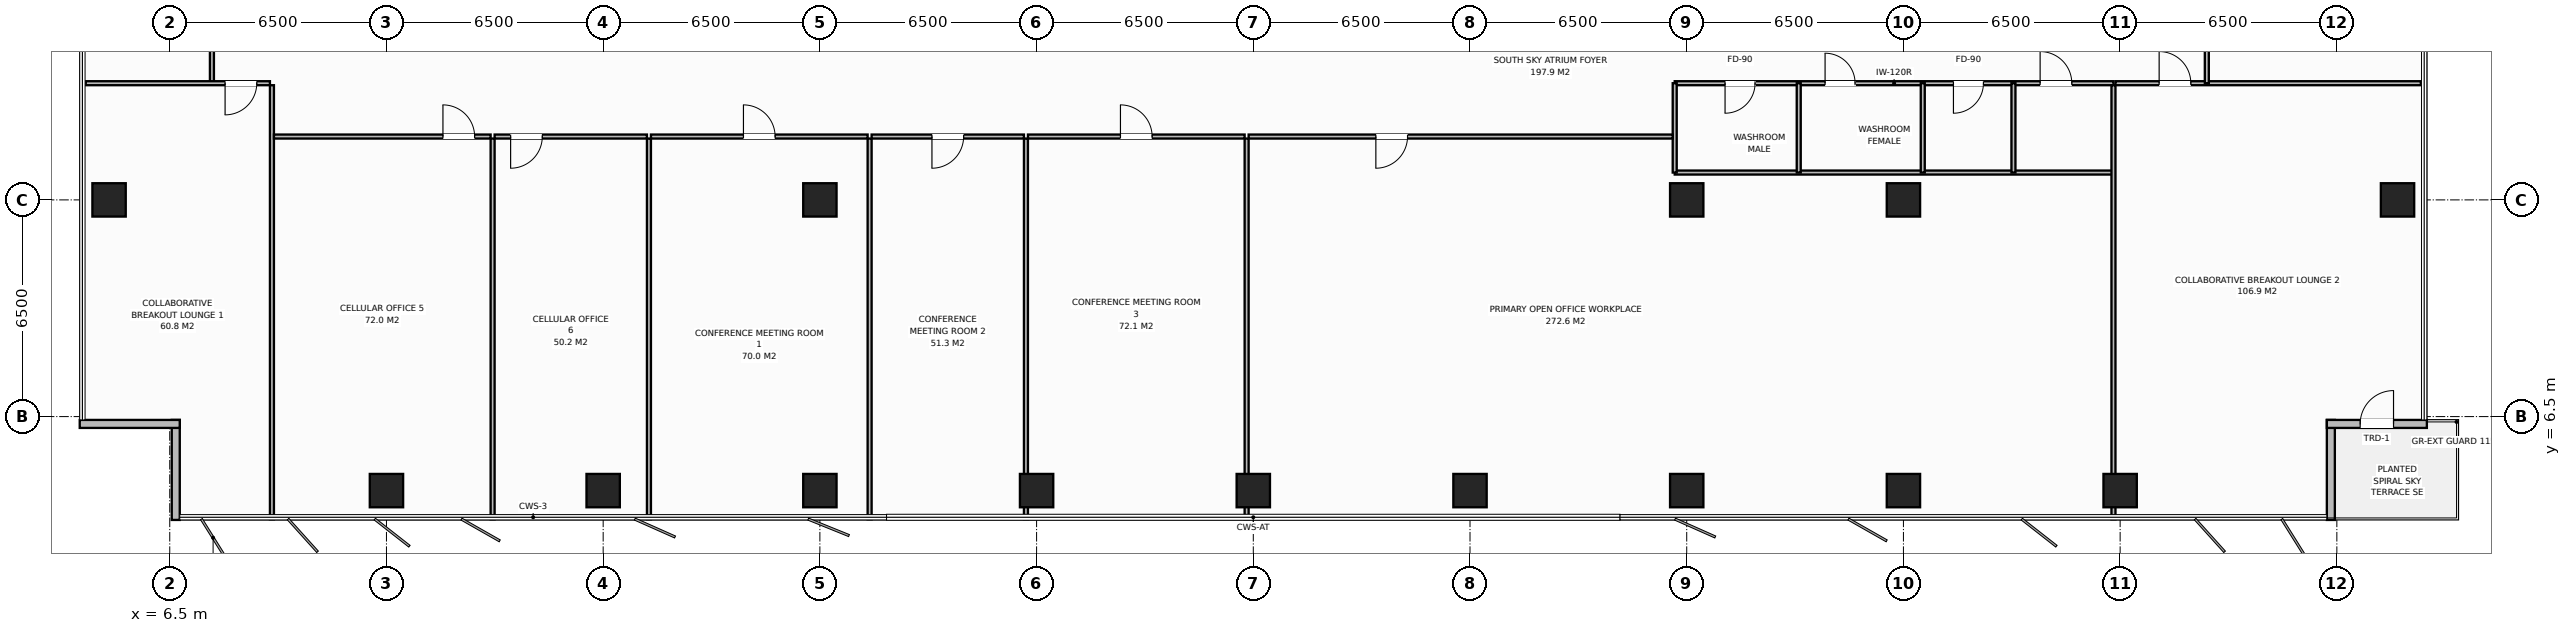
"""IFC4 building model, lengths in metres.
Left out: names, types, materials, properties, quantities, classifications, styles, units other than length and angle.
Written with IfcOpenShell. Run it as: python <this file> out.ifc"""

import sys

from ifc_helpers import new_model, si_unit, direction, frame, frame_2d, origin, origin_2d, place, context, subcontext, project, spatial, rectangle, extrude, element, fill, save


model = new_model("IFC4")
c1 = context("Model", 3, precision=1e-05, world=origin(), true_north=direction((0.0, 1.0)))
c2 = subcontext(c1, "Body", "Model", "MODEL_VIEW")
j1 = project(units=[si_unit("LENGTHUNIT", "METRE"), si_unit("PLANEANGLEUNIT", "RADIAN")], contexts=[c1])
p1 = place(None, origin())
s1 = spatial("IfcSite", under=j1, at=p1, CompositionType="ELEMENT")
p2 = place(p1, origin())
s2 = spatial("IfcBuilding", under=s1, at=p2, CompositionType="ELEMENT")
p3 = place(p2, frame((0.0, 0.0, 174.6)))
s3 = spatial("IfcBuildingStorey", under=s2, at=p3, CompositionType="ELEMENT", Elevation=174.6)
for number, where, z_axis, x_axis in (
    (1, (58.5, 13.0, 0.0), (0.0, 0.0, 1.0), (1.0, 0.0, 0.0)),
    (2, (26.0, 13.0, 0.0), (0.0, 0.0, 1.0), (1.0, 0.0, 0.0)),
    (3, (52.0, 13.0, 0.0), (0.0, 0.0, 1.0), (1.0, 0.0, 0.0)),
    (4, (13.0, 4.28, 0.0), (0.0, 0.0, 1.0), (1.0, 0.0, 0.0)),
    (5, (19.5, 4.28, 0.0), (0.0, 0.0, 1.0), (1.0, 0.0, 0.0)),
    (6, (26.0, 4.28, 0.0), (0.0, 0.0, 1.0), (1.0, 0.0, 0.0)),
    (7, (32.5, 4.28, 0.0), (0.0, 0.0, 1.0), (1.0, 0.0, 0.0)),
    (8, (39.0, 4.28, 0.0), (0.0, 0.0, 1.0), (1.0, 0.0, 0.0)),
    (9, (45.5, 4.28, 0.0), (0.0, 0.0, 1.0), (1.0, 0.0, 0.0)),
    (10, (52.0, 4.28, 0.0), (0.0, 0.0, 1.0), (1.0, 0.0, 0.0)),
    (11, (58.5, 4.28, 0.0), (0.0, 0.0, 1.0), (1.0, 0.0, 0.0)),
    (12, (65.0, 4.28, 0.0), (0.0, 0.0, 1.0), (1.0, 0.0, 0.0)),
    (13, (4.68, 13.0, 0.0), (0.0, 0.0, 1.0), (1.0, 0.0, 0.0)),
    (14, (73.32, 13.0, 0.0), (0.0, 0.0, 1.0), (1.0, 0.0, 0.0)),
):
    element("IfcColumn", number, at=place(p3, frame(where, z_axis=z_axis, x_axis=x_axis)), inside=s3, PredefinedType="COLUMN", context=c2, shape_type="SweptSolid", body=[
        extrude(rectangle(XDim=1.0, YDim=1.0, at=origin_2d()), origin(), (0.0, 0.0, 1.0), 3.8),
    ])
for number, where, z_axis, x_axis in (
    (15, (6.68, 3.4, 0.0), (0.0, 0.0, 1.0), (0.0, 1.0, 0.0)),
    (16, (6.8, 6.28, 0.0), (0.0, 0.0, 1.0), (-1.0, 0.0, 0.0)),
    (17, (71.32, 6.4, 0.0), (0.0, 0.0, 1.0), (0.0, -1.0, 0.0)),
):
    element("IfcWall", number, at=place(p3, frame(where, z_axis=z_axis, x_axis=x_axis)), inside=s3, PredefinedType="STANDARD", context=c2, shape_type="SweptSolid", body=[
        extrude(rectangle(XDim=3.0, YDim=0.24, at=frame_2d((1.5, 0.0))), origin(), (0.0, 0.0, 1.0), 3.572),
    ])
p4 = place(p3, frame((74.2, 6.28, 0.0), z_axis=(0.0, 0.0, 1.0), x_axis=(-1.0, 0.0, 0.0)))
e18 = element("IfcWall", 18, at=p4, inside=s3, PredefinedType="STANDARD", context=c2, shape_type="SweptSolid", body=[
    extrude(rectangle(XDim=3.0, YDim=0.24, at=frame_2d((1.5, 0.0))), origin(), (0.0, 0.0, 1.0), 3.572),
])
p5 = place(p4, frame((1.0, 0.0, 0.0)))
e19 = element("IfcOpeningElement", 19, at=p5, cuts=e18, PredefinedType="OPENING", context=c2, shape_type="SweptSolid", body=[
    extrude(rectangle(XDim=1.0, YDim=2.2, at=frame_2d((0.5, 1.1))), frame((0.0, 0.13, 0.0), z_axis=(0.0, -1.0, 0.0), x_axis=(1.0, 0.0, 0.0)), (0.0, 0.0, 1.0), 0.26),
])
p6 = place(p3, frame((7.765, 16.5, 0.0), z_axis=(0.0, 0.0, 1.0), x_axis=(0.0, 1.0, 0.0)))
e20 = element("IfcWall", 20, at=p6, inside=s3, PredefinedType="PARTITIONING", context=c2, shape_type="SweptSolid", body=[
    extrude(rectangle(XDim=2.1, YDim=0.12, at=frame_2d((1.05, 0.0))), origin(), (0.0, 0.0, 1.0), 3.572),
])
p7 = place(p3, frame((51.64, 16.5, 0.0), z_axis=(0.0, 0.0, 1.0), x_axis=(1.0, 0.0, 0.0)))
e21 = element("IfcWall", 21, at=p7, inside=s3, PredefinedType="PARTITIONING", context=c2, shape_type="SweptSolid", body=[
    extrude(rectangle(XDim=13.16, YDim=0.12, at=frame_2d((6.58, 0.0))), origin(), (0.0, 0.0, 1.0), 3.572),
])
p8 = place(p7, frame((1.51, 0.0, 0.0)))
e22 = element("IfcOpeningElement", 22, at=p8, cuts=e21, PredefinedType="OPENING", context=c2, shape_type="SweptSolid", body=[
    extrude(rectangle(XDim=0.9, YDim=2.15, at=frame_2d((0.45, 1.075))), frame((0.0, 0.07, 0.0), z_axis=(0.0, -1.0, 0.0), x_axis=(1.0, 0.0, 0.0)), (0.0, 0.0, 1.0), 0.14),
])
p9 = place(p7, frame((4.51, 0.0, 0.0)))
e23 = element("IfcOpeningElement", 23, at=p9, cuts=e21, PredefinedType="OPENING", context=c2, shape_type="SweptSolid", body=[
    extrude(rectangle(XDim=0.9, YDim=2.15, at=frame_2d((0.45, 1.075))), frame((0.0, 0.07, 0.0), z_axis=(0.0, -1.0, 0.0), x_axis=(1.0, 0.0, 0.0)), (0.0, 0.0, 1.0), 0.14),
])
p10 = place(p7, frame((8.36, 0.0, 0.0)))
e24 = element("IfcOpeningElement", 24, at=p10, cuts=e21, PredefinedType="OPENING", context=c2, shape_type="SweptSolid", body=[
    extrude(rectangle(XDim=0.9, YDim=2.15, at=frame_2d((0.45, 1.075))), frame((0.0, 0.07, 0.0), z_axis=(0.0, -1.0, 0.0), x_axis=(1.0, 0.0, 0.0)), (0.0, 0.0, 1.0), 0.14),
])
p11 = place(p7, frame((10.96, 0.0, 0.0)))
e25 = element("IfcOpeningElement", 25, at=p11, cuts=e21, PredefinedType="OPENING", context=c2, shape_type="SweptSolid", body=[
    extrude(rectangle(XDim=0.95, YDim=2.15, at=frame_2d((0.475, 1.075))), frame((0.0, 0.07, 0.0), z_axis=(0.0, -1.0, 0.0), x_axis=(1.0, 0.0, 0.0)), (0.0, 0.0, 1.0), 0.14),
])
p12 = place(p3, frame((51.64, 13.82, 0.0), z_axis=(0.0, 0.0, 1.0), x_axis=(1.0, 0.0, 0.0)))
e26 = element("IfcWall", 26, at=p12, inside=s3, PredefinedType="PARTITIONING", context=c2, shape_type="SweptSolid", body=[
    extrude(rectangle(XDim=13.16, YDim=0.12, at=frame_2d((6.58, 0.0))), origin(), (0.0, 0.0, 1.0), 3.572),
])
for number, where, z_axis, x_axis in (
    (27, (51.64, 13.82, 0.0), (0.0, 0.0, 1.0), (0.0, 1.0, 0.0)),
    (28, (55.36, 13.82, 0.0), (0.0, 0.0, 1.0), (0.0, 1.0, 0.0)),
    (29, (59.08, 13.82, 0.0), (0.0, 0.0, 1.0), (0.0, 1.0, 0.0)),
    (30, (61.8, 13.82, 0.0), (0.0, 0.0, 1.0), (0.0, 1.0, 0.0)),
):
    element("IfcWall", number, at=place(p3, frame(where, z_axis=z_axis, x_axis=x_axis)), inside=s3, PredefinedType="PARTITIONING", context=c2, shape_type="SweptSolid", body=[
        extrude(rectangle(XDim=2.68, YDim=0.12, at=frame_2d((1.34, 0.0))), origin(), (0.0, 0.0, 1.0), 3.572),
    ])
p13 = place(p3, frame((9.565, 3.42, 0.0), z_axis=(0.0, 0.0, 1.0), x_axis=(0.0, 1.0, 0.0)))
e31 = element("IfcWall", 31, at=p13, inside=s3, PredefinedType="PARTITIONING", context=c2, shape_type="SweptSolid", body=[
    extrude(rectangle(XDim=13.02, YDim=0.12, at=frame_2d((6.51, 0.0))), origin(), (0.0, 0.0, 1.0), 3.572),
])
p14 = place(p3, frame((3.98, 16.5, 0.0), z_axis=(0.0, 0.0, 1.0), x_axis=(1.0, 0.0, 0.0)))
e32 = element("IfcWall", 32, at=p14, inside=s3, PredefinedType="PARTITIONING", context=c2, shape_type="SweptSolid", body=[
    extrude(rectangle(XDim=5.525, YDim=0.12, at=frame_2d((2.762, 0.0))), origin(), (0.0, 0.0, 1.0), 3.572),
])
p15 = place(p14, frame((4.18, 0.0, 0.0)))
e33 = element("IfcOpeningElement", 33, at=p15, cuts=e32, PredefinedType="OPENING", context=c2, shape_type="SweptSolid", body=[
    extrude(rectangle(XDim=0.95, YDim=2.15, at=frame_2d((0.475, 1.075))), frame((0.0, 0.07, 0.0), z_axis=(0.0, -1.0, 0.0), x_axis=(1.0, 0.0, 0.0)), (0.0, 0.0, 1.0), 0.14),
])
p16 = place(p3, frame((16.184, 3.42, 0.0), z_axis=(0.0, 0.0, 1.0), x_axis=(0.0, 1.0, 0.0)))
e34 = element("IfcWall", 34, at=p16, inside=s3, PredefinedType="PARTITIONING", context=c2, shape_type="SweptSolid", body=[
    extrude(rectangle(XDim=11.42, YDim=0.12, at=frame_2d((5.71, 0.0))), origin(), (0.0, 0.0, 1.0), 3.572),
])
p17 = place(p3, frame((9.625, 14.9, 0.0), z_axis=(0.0, 0.0, 1.0), x_axis=(1.0, 0.0, 0.0)))
e35 = element("IfcWall", 35, at=p17, inside=s3, PredefinedType="PARTITIONING", context=c2, shape_type="SweptSolid", body=[
    extrude(rectangle(XDim=6.499, YDim=0.12, at=frame_2d((3.25, 0.0))), origin(), (0.0, 0.0, 1.0), 3.572),
])
p18 = place(p17, frame((5.069, 0.0, 0.0)))
e36 = element("IfcOpeningElement", 36, at=p18, cuts=e35, PredefinedType="OPENING", context=c2, shape_type="SweptSolid", body=[
    extrude(rectangle(XDim=0.95, YDim=2.15, at=frame_2d((0.475, 1.075))), frame((0.0, 0.07, 0.0), z_axis=(0.0, -1.0, 0.0), x_axis=(1.0, 0.0, 0.0)), (0.0, 0.0, 1.0), 0.14),
])
p19 = place(p3, frame((20.873, 3.42, 0.0), z_axis=(0.0, 0.0, 1.0), x_axis=(0.0, 1.0, 0.0)))
e37 = element("IfcWall", 37, at=p19, inside=s3, PredefinedType="PARTITIONING", context=c2, shape_type="SweptSolid", body=[
    extrude(rectangle(XDim=11.42, YDim=0.12, at=frame_2d((5.71, 0.0))), origin(), (0.0, 0.0, 1.0), 3.572),
])
p20 = place(p3, frame((16.244, 14.9, 0.0), z_axis=(0.0, 0.0, 1.0), x_axis=(1.0, 0.0, 0.0)))
e38 = element("IfcWall", 38, at=p20, inside=s3, PredefinedType="PARTITIONING", context=c2, shape_type="SweptSolid", body=[
    extrude(rectangle(XDim=4.569, YDim=0.12, at=frame_2d((2.284, 0.0))), origin(), (0.0, 0.0, 1.0), 3.572),
])
p21 = place(p20, frame((0.48, 0.0, 0.0)))
e39 = element("IfcOpeningElement", 39, at=p21, cuts=e38, PredefinedType="OPENING", context=c2, shape_type="SweptSolid", body=[
    extrude(rectangle(XDim=0.95, YDim=2.15, at=frame_2d((0.475, 1.075))), frame((0.0, 0.07, 0.0), z_axis=(0.0, -1.0, 0.0), x_axis=(1.0, 0.0, 0.0)), (0.0, 0.0, 1.0), 0.14),
])
p22 = place(p3, frame((27.492, 3.42, 0.0), z_axis=(0.0, 0.0, 1.0), x_axis=(0.0, 1.0, 0.0)))
e40 = element("IfcWall", 40, at=p22, inside=s3, PredefinedType="PARTITIONING", context=c2, shape_type="SweptSolid", body=[
    extrude(rectangle(XDim=11.42, YDim=0.12, at=frame_2d((5.71, 0.0))), origin(), (0.0, 0.0, 1.0), 3.572),
])
p23 = place(p3, frame((20.933, 14.9, 0.0), z_axis=(0.0, 0.0, 1.0), x_axis=(1.0, 0.0, 0.0)))
e41 = element("IfcWall", 41, at=p23, inside=s3, PredefinedType="PARTITIONING", context=c2, shape_type="SweptSolid", body=[
    extrude(rectangle(XDim=6.499, YDim=0.12, at=frame_2d((3.25, 0.0))), origin(), (0.0, 0.0, 1.0), 3.572),
])
p24 = place(p23, frame((2.775, 0.0, 0.0)))
e42 = element("IfcOpeningElement", 42, at=p24, cuts=e41, PredefinedType="OPENING", context=c2, shape_type="SweptSolid", body=[
    extrude(rectangle(XDim=0.95, YDim=2.15, at=frame_2d((0.475, 1.075))), frame((0.0, 0.07, 0.0), z_axis=(0.0, -1.0, 0.0), x_axis=(1.0, 0.0, 0.0)), (0.0, 0.0, 1.0), 0.14),
])
p25 = place(p3, frame((32.181, 3.42, 0.0), z_axis=(0.0, 0.0, 1.0), x_axis=(0.0, 1.0, 0.0)))
e43 = element("IfcWall", 43, at=p25, inside=s3, PredefinedType="PARTITIONING", context=c2, shape_type="SweptSolid", body=[
    extrude(rectangle(XDim=11.42, YDim=0.12, at=frame_2d((5.71, 0.0))), origin(), (0.0, 0.0, 1.0), 3.572),
])
p26 = place(p3, frame((27.552, 14.9, 0.0), z_axis=(0.0, 0.0, 1.0), x_axis=(1.0, 0.0, 0.0)))
e44 = element("IfcWall", 44, at=p26, inside=s3, PredefinedType="PARTITIONING", context=c2, shape_type="SweptSolid", body=[
    extrude(rectangle(XDim=4.569, YDim=0.12, at=frame_2d((2.284, 0.0))), origin(), (0.0, 0.0, 1.0), 3.572),
])
p27 = place(p26, frame((1.809, 0.0, 0.0)))
e45 = element("IfcOpeningElement", 45, at=p27, cuts=e44, PredefinedType="OPENING", context=c2, shape_type="SweptSolid", body=[
    extrude(rectangle(XDim=0.95, YDim=2.15, at=frame_2d((0.475, 1.075))), frame((0.0, 0.07, 0.0), z_axis=(0.0, -1.0, 0.0), x_axis=(1.0, 0.0, 0.0)), (0.0, 0.0, 1.0), 0.14),
])
p28 = place(p3, frame((38.8, 3.42, 0.0), z_axis=(0.0, 0.0, 1.0), x_axis=(0.0, 1.0, 0.0)))
e46 = element("IfcWall", 46, at=p28, inside=s3, PredefinedType="PARTITIONING", context=c2, shape_type="SweptSolid", body=[
    extrude(rectangle(XDim=11.42, YDim=0.12, at=frame_2d((5.71, 0.0))), origin(), (0.0, 0.0, 1.0), 3.022),
])
p29 = place(p3, frame((32.241, 14.9, 0.0), z_axis=(0.0, 0.0, 1.0), x_axis=(1.0, 0.0, 0.0)))
e47 = element("IfcWall", 47, at=p29, inside=s3, PredefinedType="PARTITIONING", context=c2, shape_type="SweptSolid", body=[
    extrude(rectangle(XDim=6.499, YDim=0.12, at=frame_2d((3.25, 0.0))), origin(), (0.0, 0.0, 1.0), 3.572),
])
p30 = place(p29, frame((2.775, 0.0, 0.0)))
e48 = element("IfcOpeningElement", 48, at=p30, cuts=e47, PredefinedType="OPENING", context=c2, shape_type="SweptSolid", body=[
    extrude(rectangle(XDim=0.95, YDim=2.15, at=frame_2d((0.475, 1.075))), frame((0.0, 0.07, 0.0), z_axis=(0.0, -1.0, 0.0), x_axis=(1.0, 0.0, 0.0)), (0.0, 0.0, 1.0), 0.14),
])
p31 = place(p3, frame((64.8, 3.42, 0.0), z_axis=(0.0, 0.0, 1.0), x_axis=(0.0, 1.0, 0.0)))
e49 = element("IfcWall", 49, at=p31, inside=s3, PredefinedType="PARTITIONING", context=c2, shape_type="SweptSolid", body=[
    extrude(rectangle(XDim=13.02, YDim=0.12, at=frame_2d((6.51, 0.0))), origin(), (0.0, 0.0, 1.0), 3.022),
])
p32 = place(p3, frame((38.86, 14.9, 0.0), z_axis=(0.0, 0.0, 1.0), x_axis=(1.0, 0.0, 0.0)))
e50 = element("IfcWall", 50, at=p32, inside=s3, PredefinedType="PARTITIONING", context=c2, shape_type="SweptSolid", body=[
    extrude(rectangle(XDim=12.72, YDim=0.12, at=frame_2d((6.36, 0.0))), origin(), (0.0, 0.0, 1.0), 3.572),
])
p33 = place(p32, frame((3.816, 0.0, 0.0)))
e51 = element("IfcOpeningElement", 51, at=p33, cuts=e50, PredefinedType="OPENING", context=c2, shape_type="SweptSolid", body=[
    extrude(rectangle(XDim=0.95, YDim=2.15, at=frame_2d((0.475, 1.075))), frame((0.0, 0.07, 0.0), z_axis=(0.0, -1.0, 0.0), x_axis=(1.0, 0.0, 0.0)), (0.0, 0.0, 1.0), 0.14),
])
p34 = place(p3, frame((64.86, 16.5, 0.0), z_axis=(0.0, 0.0, 1.0), x_axis=(1.0, 0.0, 0.0)))
e52 = element("IfcWall", 52, at=p34, inside=s3, PredefinedType="PARTITIONING", context=c2, shape_type="SweptSolid", body=[
    extrude(rectangle(XDim=9.16, YDim=0.12, at=frame_2d((4.58, 0.0))), origin(), (0.0, 0.0, 1.0), 3.572),
])
p35 = place(p34, frame((1.31, 0.0, 0.0)))
e53 = element("IfcOpeningElement", 53, at=p35, cuts=e52, PredefinedType="OPENING", context=c2, shape_type="SweptSolid", body=[
    extrude(rectangle(XDim=0.95, YDim=2.15, at=frame_2d((0.475, 1.075))), frame((0.0, 0.07, 0.0), z_axis=(0.0, -1.0, 0.0), x_axis=(1.0, 0.0, 0.0)), (0.0, 0.0, 1.0), 0.14),
])
p36 = place(p3, frame((67.6, 16.5, 0.0), z_axis=(0.0, 0.0, 1.0), x_axis=(0.0, 1.0, 0.0)))
e54 = element("IfcWall", 54, at=p36, inside=s3, PredefinedType="PARTITIONING", context=c2, shape_type="SweptSolid", body=[
    extrude(rectangle(XDim=19.0, YDim=0.12, at=frame_2d((9.5, 0.0))), origin(), (0.0, 0.0, 1.0), 3.572),
])
p37 = place(p36, frame((9.025, 0.0, 0.0)))
e55 = element("IfcOpeningElement", 55, at=p37, cuts=e54, PredefinedType="OPENING", context=c2, shape_type="SweptSolid", body=[
    extrude(rectangle(XDim=0.95, YDim=2.15, at=frame_2d((0.475, 1.075))), frame((0.0, 0.07, 0.0), z_axis=(0.0, -1.0, 0.0), x_axis=(1.0, 0.0, 0.0)), (0.0, 0.0, 1.0), 0.14),
])
p38 = place(p5, origin())
e56 = element("IfcDoor", 56, at=p38, inside=s3, OperationType="SINGLE_SWING_RIGHT", PredefinedType="DOOR", context=c2, shape_type="SweptSolid", body=[
    extrude(rectangle(XDim=1.0, YDim=2.2, at=frame_2d((0.5, 1.1))), frame((0.0, 0.025, 0.0), z_axis=(0.0, -1.0, 0.0), x_axis=(1.0, 0.0, 0.0)), (0.0, 0.0, 1.0), 0.05),
])
fill(e19, e56)
p39 = place(p8, origin())
e57 = element("IfcDoor", 57, at=p39, inside=s3, OperationType="SINGLE_SWING_RIGHT", PredefinedType="DOOR", context=c2, shape_type="SweptSolid", body=[
    extrude(rectangle(XDim=0.9, YDim=2.15, at=frame_2d((0.45, 1.075))), frame((0.0, 0.025, 0.0), z_axis=(0.0, -1.0, 0.0), x_axis=(1.0, 0.0, 0.0)), (0.0, 0.0, 1.0), 0.05),
])
fill(e22, e57)
p40 = place(p9, origin())
e58 = element("IfcDoor", 58, at=p40, inside=s3, OperationType="SINGLE_SWING_LEFT", PredefinedType="DOOR", context=c2, shape_type="SweptSolid", body=[
    extrude(rectangle(XDim=0.9, YDim=2.15, at=frame_2d((0.45, 1.075))), frame((0.0, 0.025, 0.0), z_axis=(0.0, -1.0, 0.0), x_axis=(1.0, 0.0, 0.0)), (0.0, 0.0, 1.0), 0.05),
])
fill(e23, e58)
p41 = place(p10, origin())
e59 = element("IfcDoor", 59, at=p41, inside=s3, OperationType="SINGLE_SWING_RIGHT", PredefinedType="DOOR", context=c2, shape_type="SweptSolid", body=[
    extrude(rectangle(XDim=0.9, YDim=2.15, at=frame_2d((0.45, 1.075))), frame((0.0, 0.025, 0.0), z_axis=(0.0, -1.0, 0.0), x_axis=(1.0, 0.0, 0.0)), (0.0, 0.0, 1.0), 0.05),
])
fill(e24, e59)
p42 = place(p11, origin())
e60 = element("IfcDoor", 60, at=p42, inside=s3, OperationType="SINGLE_SWING_LEFT", PredefinedType="DOOR", context=c2, shape_type="SweptSolid", body=[
    extrude(rectangle(XDim=0.95, YDim=2.15, at=frame_2d((0.475, 1.075))), frame((0.0, 0.025, 0.0), z_axis=(0.0, -1.0, 0.0), x_axis=(1.0, 0.0, 0.0)), (0.0, 0.0, 1.0), 0.05),
])
fill(e25, e60)
p43 = place(p15, origin())
e61 = element("IfcDoor", 61, at=p43, inside=s3, OperationType="SINGLE_SWING_RIGHT", PredefinedType="DOOR", context=c2, shape_type="SweptSolid", body=[
    extrude(rectangle(XDim=0.95, YDim=2.15, at=frame_2d((0.475, 1.075))), frame((0.0, 0.025, 0.0), z_axis=(0.0, -1.0, 0.0), x_axis=(1.0, 0.0, 0.0)), (0.0, 0.0, 1.0), 0.05),
])
fill(e33, e61)
p44 = place(p18, origin())
e62 = element("IfcDoor", 62, at=p44, inside=s3, OperationType="SINGLE_SWING_LEFT", PredefinedType="DOOR", context=c2, shape_type="SweptSolid", body=[
    extrude(rectangle(XDim=0.95, YDim=2.15, at=frame_2d((0.475, 1.075))), frame((0.0, 0.025, 0.0), z_axis=(0.0, -1.0, 0.0), x_axis=(1.0, 0.0, 0.0)), (0.0, 0.0, 1.0), 0.05),
])
fill(e36, e62)
p45 = place(p21, origin())
e63 = element("IfcDoor", 63, at=p45, inside=s3, OperationType="SINGLE_SWING_RIGHT", PredefinedType="DOOR", context=c2, shape_type="SweptSolid", body=[
    extrude(rectangle(XDim=0.95, YDim=2.15, at=frame_2d((0.475, 1.075))), frame((0.0, 0.025, 0.0), z_axis=(0.0, -1.0, 0.0), x_axis=(1.0, 0.0, 0.0)), (0.0, 0.0, 1.0), 0.05),
])
fill(e39, e63)
p46 = place(p24, origin())
e64 = element("IfcDoor", 64, at=p46, inside=s3, OperationType="SINGLE_SWING_LEFT", PredefinedType="DOOR", context=c2, shape_type="SweptSolid", body=[
    extrude(rectangle(XDim=0.95, YDim=2.15, at=frame_2d((0.475, 1.075))), frame((0.0, 0.025, 0.0), z_axis=(0.0, -1.0, 0.0), x_axis=(1.0, 0.0, 0.0)), (0.0, 0.0, 1.0), 0.05),
])
fill(e42, e64)
p47 = place(p27, origin())
e65 = element("IfcDoor", 65, at=p47, inside=s3, OperationType="SINGLE_SWING_RIGHT", PredefinedType="DOOR", context=c2, shape_type="SweptSolid", body=[
    extrude(rectangle(XDim=0.95, YDim=2.15, at=frame_2d((0.475, 1.075))), frame((0.0, 0.025, 0.0), z_axis=(0.0, -1.0, 0.0), x_axis=(1.0, 0.0, 0.0)), (0.0, 0.0, 1.0), 0.05),
])
fill(e45, e65)
p48 = place(p30, origin())
e66 = element("IfcDoor", 66, at=p48, inside=s3, OperationType="SINGLE_SWING_LEFT", PredefinedType="DOOR", context=c2, shape_type="SweptSolid", body=[
    extrude(rectangle(XDim=0.95, YDim=2.15, at=frame_2d((0.475, 1.075))), frame((0.0, 0.025, 0.0), z_axis=(0.0, -1.0, 0.0), x_axis=(1.0, 0.0, 0.0)), (0.0, 0.0, 1.0), 0.05),
])
fill(e48, e66)
p49 = place(p33, origin())
e67 = element("IfcDoor", 67, at=p49, inside=s3, OperationType="SINGLE_SWING_RIGHT", PredefinedType="DOOR", context=c2, shape_type="SweptSolid", body=[
    extrude(rectangle(XDim=0.95, YDim=2.15, at=frame_2d((0.475, 1.075))), frame((0.0, 0.025, 0.0), z_axis=(0.0, -1.0, 0.0), x_axis=(1.0, 0.0, 0.0)), (0.0, 0.0, 1.0), 0.05),
])
fill(e51, e67)
p50 = place(p35, origin())
e68 = element("IfcDoor", 68, at=p50, inside=s3, OperationType="SINGLE_SWING_LEFT", PredefinedType="DOOR", context=c2, shape_type="SweptSolid", body=[
    extrude(rectangle(XDim=0.95, YDim=2.15, at=frame_2d((0.475, 1.075))), frame((0.0, 0.025, 0.0), z_axis=(0.0, -1.0, 0.0), x_axis=(1.0, 0.0, 0.0)), (0.0, 0.0, 1.0), 0.05),
])
fill(e53, e68)
save(model, sys.argv[1])
